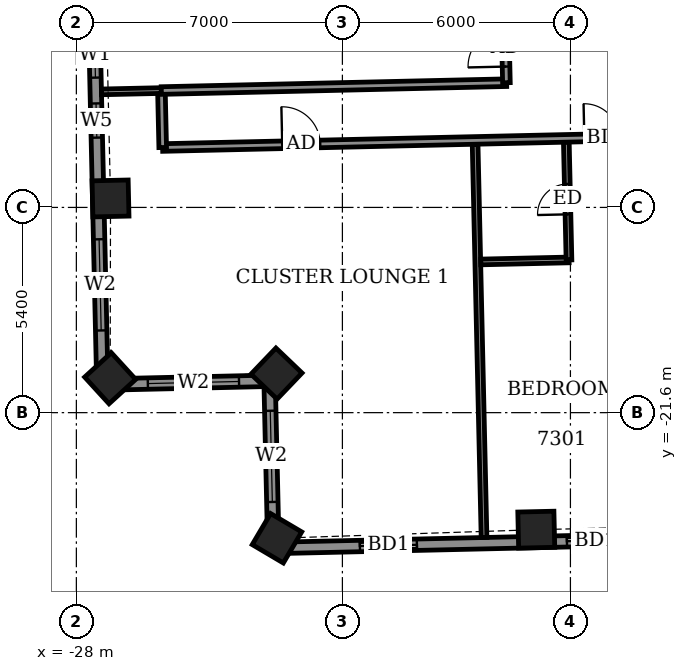
"""IFC4 building model, lengths in metres.
Left out: names, types, materials, properties, quantities, classifications, styles, units other than length and angle.
Written with IfcOpenShell. Run it as: python <this file> out.ifc"""

import sys

from ifc_helpers import new_model, si_unit, direction, frame, frame_2d, origin, origin_2d, place, context, subcontext, project, spatial, rectangle, extrude, element, fill, save


model = new_model("IFC4")
c1 = context("Model", 3, precision=1e-05, world=origin(), true_north=direction((0.0, 1.0)))
c2 = subcontext(c1, "Body", "Model", "MODEL_VIEW")
j1 = project(units=[si_unit("LENGTHUNIT", "METRE"), si_unit("PLANEANGLEUNIT", "RADIAN")], contexts=[c1])
p1 = place(None, origin())
s1 = spatial("IfcSite", under=j1, at=p1, CompositionType="ELEMENT")
p2 = place(p1, origin())
s2 = spatial("IfcBuilding", under=s1, at=p2, CompositionType="ELEMENT")
p3 = place(p2, frame((0.0, 0.0, 287.1)))
s3 = spatial("IfcBuildingStorey", under=s2, at=p3, CompositionType="ELEMENT", Elevation=287.1)
for number, where, z_axis, x_axis in (
    (1, (-27.101, -15.964, -0.55), (0.0, 0.0, 1.0), (0.023, -1.0, 0.0)),
    (2, (-27.11, -20.695, -0.55), (0.0, 0.0, 1.0), (0.675, -0.738, 0.0)),
    (3, (-22.734, -20.572, -0.55), (0.0, 0.0, 1.0), (0.723, -0.691, 0.0)),
    (4, (-22.721, -24.905, -0.55), (0.0, 0.0, 1.0), (0.861, -0.509, 0.0)),
    (5, (-15.899, -24.679, -0.55), (0.0, 0.0, 1.0), (1.0, 0.023, 0.0)),
):
    element("IfcColumn", number, at=place(p3, frame(where, z_axis=z_axis, x_axis=x_axis)), inside=s3, PredefinedType="COLUMN", context=c2, shape_type="SweptSolid", body=[
        extrude(rectangle(XDim=0.95, YDim=0.95, at=origin_2d()), origin(), (0.0, 0.0, 1.0), 3.6),
    ])
p4 = place(p3, frame((-27.665, -5.416, 0.0), z_axis=(0.0, 0.0, 1.0), x_axis=(0.022660024814, -0.999743228672, 0.0)))
e6 = element("IfcWall", 6, at=p4, inside=s3, PredefinedType="SOLIDWALL", context=c2, shape_type="SweptSolid", body=[
    extrude(rectangle(XDim=15.45, YDim=0.3, at=frame_2d((7.725, 0.0))), origin(), (0.0, 0.0, 1.0), 2.55),
])
p5 = place(p4, frame((1.35, 0.0, 0.0)))
e7 = element("IfcOpeningElement", 7, at=p5, cuts=e6, PredefinedType="OPENING", context=c2, shape_type="SweptSolid", body=[
    extrude(rectangle(XDim=1.5, YDim=2.4, at=frame_2d((0.75, 1.2))), frame((0.0, 0.16, 0.0), z_axis=(0.0, -1.0, 0.0), x_axis=(1.0, 0.0, 0.0)), (0.0, 0.0, 1.0), 0.32),
])
p6 = place(p4, frame((6.171, 0.0, 0.9)))
e8 = element("IfcOpeningElement", 8, at=p6, cuts=e6, PredefinedType="OPENING", context=c2, shape_type="SweptSolid", body=[
    extrude(rectangle(XDim=1.2, YDim=1.5, at=frame_2d((0.6, 0.75))), frame((0.0, 0.16, 0.0), z_axis=(0.0, -1.0, 0.0), x_axis=(1.0, 0.0, 0.0)), (0.0, 0.0, 1.0), 0.32),
])
p7 = place(p4, frame((8.05, 0.0, 0.9)))
e9 = element("IfcOpeningElement", 9, at=p7, cuts=e6, PredefinedType="OPENING", context=c2, shape_type="SweptSolid", body=[
    extrude(rectangle(XDim=0.9, YDim=1.5, at=frame_2d((0.45, 0.75))), frame((0.0, 0.16, 0.0), z_axis=(0.0, -1.0, 0.0), x_axis=(1.0, 0.0, 0.0)), (0.0, 0.0, 1.0), 0.32),
])
p8 = place(p4, frame((11.625, 0.0, 0.9)))
e10 = element("IfcOpeningElement", 10, at=p8, cuts=e6, PredefinedType="OPENING", context=c2, shape_type="SweptSolid", body=[
    extrude(rectangle(XDim=2.4, YDim=1.5, at=frame_2d((1.2, 0.75))), frame((0.0, 0.16, 0.0), z_axis=(0.0, -1.0, 0.0), x_axis=(1.0, 0.0, 0.0)), (0.0, 0.0, 1.0), 0.32),
])
p9 = place(p3, frame((-27.315, -20.862, 0.0), z_axis=(0.0, 0.0, 1.0), x_axis=(0.999741204967, 0.022749133868, 0.0)))
e11 = element("IfcWall", 11, at=p9, inside=s3, PredefinedType="SOLIDWALL", context=c2, shape_type="SweptSolid", body=[
    extrude(rectangle(XDim=4.4, YDim=0.3, at=frame_2d((2.2, 0.0))), origin(), (0.0, 0.0, 1.0), 2.55),
])
p10 = place(p9, frame((1.196, 0.0, 0.9)))
e12 = element("IfcOpeningElement", 12, at=p10, cuts=e11, PredefinedType="OPENING", context=c2, shape_type="SweptSolid", body=[
    extrude(rectangle(XDim=2.4, YDim=1.5, at=frame_2d((1.2, 0.75))), frame((0.0, 0.16, 0.0), z_axis=(0.0, -1.0, 0.0), x_axis=(1.0, 0.0, 0.0)), (0.0, 0.0, 1.0), 0.32),
])
p11 = place(p3, frame((-22.916, -20.762, 0.0), z_axis=(0.0, 0.0, 1.0), x_axis=(0.022749133868, -0.999741204967, 0.0)))
e13 = element("IfcWall", 13, at=p11, inside=s3, PredefinedType="SOLIDWALL", context=c2, shape_type="SweptSolid", body=[
    extrude(rectangle(XDim=4.4, YDim=0.3, at=frame_2d((2.2, 0.0))), origin(), (0.0, 0.0, 1.0), 2.55),
])
p12 = place(p11, frame((0.789, 0.0, 0.9)))
e14 = element("IfcOpeningElement", 14, at=p12, cuts=e13, PredefinedType="OPENING", context=c2, shape_type="SweptSolid", body=[
    extrude(rectangle(XDim=2.4, YDim=1.5, at=frame_2d((1.2, 0.75))), frame((0.0, 0.16, 0.0), z_axis=(0.0, -1.0, 0.0), x_axis=(1.0, 0.0, 0.0)), (0.0, 0.0, 1.0), 0.32),
])
p13 = place(p3, frame((-22.816, -25.161, 0.0), z_axis=(0.0, 0.0, 1.0), x_axis=(0.999742646411, 0.022685699159, 0.0)))
e15 = element("IfcWall", 15, at=p13, inside=s3, PredefinedType="SOLIDWALL", context=c2, shape_type="SweptSolid", body=[
    extrude(rectangle(XDim=49.236, YDim=0.3, at=frame_2d((24.618, 0.0))), origin(), (0.0, 0.0, 1.0), 2.5),
])
p14 = place(p13, frame((2.277, 0.0, 0.0)))
e16 = element("IfcOpeningElement", 16, at=p14, cuts=e15, PredefinedType="OPENING", context=c2, shape_type="SweptSolid", body=[
    extrude(rectangle(XDim=1.5, YDim=2.4, at=frame_2d((0.75, 1.2))), frame((0.0, 0.16, 0.0), z_axis=(0.0, -1.0, 0.0), x_axis=(1.0, 0.0, 0.0)), (0.0, 0.0, 1.0), 0.32),
])
p15 = place(p13, frame((7.726, 0.0, 0.0)))
e17 = element("IfcOpeningElement", 17, at=p15, cuts=e15, PredefinedType="OPENING", context=c2, shape_type="SweptSolid", body=[
    extrude(rectangle(XDim=1.5, YDim=2.4, at=frame_2d((0.75, 1.2))), frame((0.0, 0.16, 0.0), z_axis=(0.0, -1.0, 0.0), x_axis=(1.0, 0.0, 0.0)), (0.0, 0.0, 1.0), 0.32),
])
p16 = place(p13, frame((11.039, 0.0, 0.0)))
e18 = element("IfcOpeningElement", 18, at=p16, cuts=e15, PredefinedType="OPENING", context=c2, shape_type="SweptSolid", body=[
    extrude(rectangle(XDim=1.5, YDim=2.4, at=frame_2d((0.75, 1.2))), frame((0.0, 0.16, 0.0), z_axis=(0.0, -1.0, 0.0), x_axis=(1.0, 0.0, 0.0)), (0.0, 0.0, 1.0), 0.32),
])
p17 = place(p13, frame((15.589, 0.0, 0.0)))
e19 = element("IfcOpeningElement", 19, at=p17, cuts=e15, PredefinedType="OPENING", context=c2, shape_type="SweptSolid", body=[
    extrude(rectangle(XDim=1.5, YDim=2.4, at=frame_2d((0.75, 1.2))), frame((0.0, 0.16, 0.0), z_axis=(0.0, -1.0, 0.0), x_axis=(1.0, 0.0, 0.0)), (0.0, 0.0, 1.0), 0.32),
])
p18 = place(p13, frame((18.903, 0.0, 0.0)))
e20 = element("IfcOpeningElement", 20, at=p18, cuts=e15, PredefinedType="OPENING", context=c2, shape_type="SweptSolid", body=[
    extrude(rectangle(XDim=1.5, YDim=2.4, at=frame_2d((0.75, 1.2))), frame((0.0, 0.16, 0.0), z_axis=(0.0, -1.0, 0.0), x_axis=(1.0, 0.0, 0.0)), (0.0, 0.0, 1.0), 0.32),
])
p19 = place(p13, frame((24.3, 0.0, 0.0)))
e21 = element("IfcOpeningElement", 21, at=p19, cuts=e15, PredefinedType="OPENING", context=c2, shape_type="SweptSolid", body=[
    extrude(rectangle(XDim=1.5, YDim=2.4, at=frame_2d((0.75, 1.2))), frame((0.0, 0.16, 0.0), z_axis=(0.0, -1.0, 0.0), x_axis=(1.0, 0.0, 0.0)), (0.0, 0.0, 1.0), 0.32),
])
p20 = place(p13, frame((29.265, 0.0, 0.0)))
e22 = element("IfcOpeningElement", 22, at=p20, cuts=e15, PredefinedType="OPENING", context=c2, shape_type="SweptSolid", body=[
    extrude(rectangle(XDim=1.5, YDim=2.4, at=frame_2d((0.75, 1.2))), frame((0.0, 0.16, 0.0), z_axis=(0.0, -1.0, 0.0), x_axis=(1.0, 0.0, 0.0)), (0.0, 0.0, 1.0), 0.32),
])
p21 = place(p13, frame((32.579, 0.0, 0.0)))
e23 = element("IfcOpeningElement", 23, at=p21, cuts=e15, PredefinedType="OPENING", context=c2, shape_type="SweptSolid", body=[
    extrude(rectangle(XDim=1.5, YDim=2.4, at=frame_2d((0.75, 1.2))), frame((0.0, 0.16, 0.0), z_axis=(0.0, -1.0, 0.0), x_axis=(1.0, 0.0, 0.0)), (0.0, 0.0, 1.0), 0.32),
])
p22 = place(p13, frame((37.4, 0.0, 0.0)))
e24 = element("IfcOpeningElement", 24, at=p22, cuts=e15, PredefinedType="OPENING", context=c2, shape_type="SweptSolid", body=[
    extrude(rectangle(XDim=1.5, YDim=2.4, at=frame_2d((0.75, 1.2))), frame((0.0, 0.16, 0.0), z_axis=(0.0, -1.0, 0.0), x_axis=(1.0, 0.0, 0.0)), (0.0, 0.0, 1.0), 0.32),
])
p23 = place(p13, frame((42.967, 0.0, 0.0)))
e25 = element("IfcOpeningElement", 25, at=p23, cuts=e15, PredefinedType="OPENING", context=c2, shape_type="SweptSolid", body=[
    extrude(rectangle(XDim=1.2, YDim=2.4, at=frame_2d((0.6, 1.2))), frame((0.0, 0.16, 0.0), z_axis=(0.0, -1.0, 0.0), x_axis=(1.0, 0.0, 0.0)), (0.0, 0.0, 1.0), 0.32),
])
p24 = place(p13, frame((45.421, 0.0, 0.9)))
e26 = element("IfcOpeningElement", 26, at=p24, cuts=e15, PredefinedType="OPENING", context=c2, shape_type="SweptSolid", body=[
    extrude(rectangle(XDim=2.4, YDim=1.5, at=frame_2d((1.2, 0.75))), frame((0.0, 0.16, 0.0), z_axis=(0.0, -1.0, 0.0), x_axis=(1.0, 0.0, 0.0)), (0.0, 0.0, 1.0), 0.32),
])
p25 = place(p3, frame((-17.273, -24.885, 0.0), z_axis=(0.0, 0.0, 1.0), x_axis=(-0.022716582742, 0.999741945138, 0.0)))
e27 = element("IfcWall", 27, at=p25, inside=s3, PredefinedType="PARTITIONING", context=c2, shape_type="SweptSolid", body=[
    extrude(rectangle(XDim=10.35, YDim=0.15, at=frame_2d((5.175, 0.0))), origin(), (0.0, 0.0, 1.0), 2.55),
])
p26 = place(p3, frame((-17.36, -17.635, 0.0), z_axis=(0.0, 0.0, 1.0), x_axis=(0.99974031529, 0.022788198363, 0.0)))
e28 = element("IfcWall", 28, at=p26, inside=s3, PredefinedType="PARTITIONING", context=c2, shape_type="SweptSolid", body=[
    extrude(rectangle(XDim=2.325, YDim=0.15, at=frame_2d((1.162, 0.0))), origin(), (0.0, 0.0, 1.0), 3.05),
])
p27 = place(p3, frame((-15.038, -17.582, 0.0), z_axis=(0.0, 0.0, 1.0), x_axis=(-0.022524613091, 0.999746288718, 0.0)))
e29 = element("IfcWall", 29, at=p27, inside=s3, PredefinedType="PARTITIONING", context=c2, shape_type="SweptSolid", body=[
    extrude(rectangle(XDim=3.1, YDim=0.15, at=frame_2d((1.55, 0.0))), origin(), (0.0, 0.0, 1.0), 3.05),
])
p28 = place(p27, frame((1.2, 0.0, 0.0)))
e30 = element("IfcOpeningElement", 30, at=p28, cuts=e29, PredefinedType="OPENING", context=c2, shape_type="SweptSolid", body=[
    extrude(rectangle(XDim=0.8, YDim=2.1, at=frame_2d((0.4, 1.05))), frame((0.0, 0.085, 0.0), z_axis=(0.0, -1.0, 0.0), x_axis=(1.0, 0.0, 0.0)), (0.0, 0.0, 1.0), 0.17),
])
p29 = place(p3, frame((-25.731, -14.624, 0.0), z_axis=(0.0, 0.0, 1.0), x_axis=(0.999742799525, 0.022678950563, 0.0)))
e31 = element("IfcWall", 31, at=p29, inside=s3, PredefinedType="PARTITIONING", context=c2, shape_type="SweptSolid", body=[
    extrude(rectangle(XDim=55.386, YDim=0.2, at=frame_2d((27.693, 0.0))), origin(), (0.0, 0.0, 1.0), 3.05),
])
p30 = place(p29, frame((3.149, 0.0, 0.0)))
e32 = element("IfcOpeningElement", 32, at=p30, cuts=e31, PredefinedType="OPENING", context=c2, shape_type="SweptSolid", body=[
    extrude(rectangle(XDim=1.0, YDim=2.1, at=frame_2d((0.5, 1.05))), frame((0.0, 0.11, 0.0), z_axis=(0.0, -1.0, 0.0), x_axis=(1.0, 0.0, 0.0)), (0.0, 0.0, 1.0), 0.22),
])
p31 = place(p29, frame((11.1, 0.0, 0.0)))
e33 = element("IfcOpeningElement", 33, at=p31, cuts=e31, PredefinedType="OPENING", context=c2, shape_type="SweptSolid", body=[
    extrude(rectangle(XDim=0.9, YDim=2.1, at=frame_2d((0.45, 1.05))), frame((0.0, 0.11, 0.0), z_axis=(0.0, -1.0, 0.0), x_axis=(1.0, 0.0, 0.0)), (0.0, 0.0, 1.0), 0.22),
])
p32 = place(p29, frame((12.95, 0.0, 0.0)))
e34 = element("IfcOpeningElement", 34, at=p32, cuts=e31, PredefinedType="OPENING", context=c2, shape_type="SweptSolid", body=[
    extrude(rectangle(XDim=0.9, YDim=2.1, at=frame_2d((0.45, 1.05))), frame((0.0, 0.11, 0.0), z_axis=(0.0, -1.0, 0.0), x_axis=(1.0, 0.0, 0.0)), (0.0, 0.0, 1.0), 0.22),
])
p33 = place(p29, frame((19.675, 0.0, 0.0)))
e35 = element("IfcOpeningElement", 35, at=p33, cuts=e31, PredefinedType="OPENING", context=c2, shape_type="SweptSolid", body=[
    extrude(rectangle(XDim=0.9, YDim=2.1, at=frame_2d((0.45, 1.05))), frame((0.0, 0.11, 0.0), z_axis=(0.0, -1.0, 0.0), x_axis=(1.0, 0.0, 0.0)), (0.0, 0.0, 1.0), 0.22),
])
p34 = place(p29, frame((21.7, 0.0, 0.0)))
e36 = element("IfcOpeningElement", 36, at=p34, cuts=e31, PredefinedType="OPENING", context=c2, shape_type="SweptSolid", body=[
    extrude(rectangle(XDim=0.9, YDim=2.1, at=frame_2d((0.45, 1.05))), frame((0.0, 0.11, 0.0), z_axis=(0.0, -1.0, 0.0), x_axis=(1.0, 0.0, 0.0)), (0.0, 0.0, 1.0), 0.22),
])
p35 = place(p29, frame((28.475, 0.0, 0.0)))
e37 = element("IfcOpeningElement", 37, at=p35, cuts=e31, PredefinedType="OPENING", context=c2, shape_type="SweptSolid", body=[
    extrude(rectangle(XDim=0.9, YDim=2.1, at=frame_2d((0.45, 1.05))), frame((0.0, 0.11, 0.0), z_axis=(0.0, -1.0, 0.0), x_axis=(1.0, 0.0, 0.0)), (0.0, 0.0, 1.0), 0.22),
])
p36 = place(p29, frame((30.45, 0.0, 0.0)))
e38 = element("IfcOpeningElement", 38, at=p36, cuts=e31, PredefinedType="OPENING", context=c2, shape_type="SweptSolid", body=[
    extrude(rectangle(XDim=0.9, YDim=2.1, at=frame_2d((0.45, 1.05))), frame((0.0, 0.11, 0.0), z_axis=(0.0, -1.0, 0.0), x_axis=(1.0, 0.0, 0.0)), (0.0, 0.0, 1.0), 0.22),
])
p37 = place(p29, frame((37.25, 0.0, 0.0)))
e39 = element("IfcOpeningElement", 39, at=p37, cuts=e31, PredefinedType="OPENING", context=c2, shape_type="SweptSolid", body=[
    extrude(rectangle(XDim=0.9, YDim=2.1, at=frame_2d((0.45, 1.05))), frame((0.0, 0.11, 0.0), z_axis=(0.0, -1.0, 0.0), x_axis=(1.0, 0.0, 0.0)), (0.0, 0.0, 1.0), 0.22),
])
p38 = place(p29, frame((39.175, 0.0, 0.0)))
e40 = element("IfcOpeningElement", 40, at=p38, cuts=e31, PredefinedType="OPENING", context=c2, shape_type="SweptSolid", body=[
    extrude(rectangle(XDim=0.9, YDim=2.1, at=frame_2d((0.45, 1.05))), frame((0.0, 0.11, 0.0), z_axis=(0.0, -1.0, 0.0), x_axis=(1.0, 0.0, 0.0)), (0.0, 0.0, 1.0), 0.22),
])
p39 = place(p29, frame((45.875, 0.0, 0.0)))
e41 = element("IfcOpeningElement", 41, at=p39, cuts=e31, PredefinedType="OPENING", context=c2, shape_type="SweptSolid", body=[
    extrude(rectangle(XDim=0.9, YDim=2.1, at=frame_2d((0.45, 1.05))), frame((0.0, 0.11, 0.0), z_axis=(0.0, -1.0, 0.0), x_axis=(1.0, 0.0, 0.0)), (0.0, 0.0, 1.0), 0.22),
])
p40 = place(p29, frame((51.127, 0.0, 0.0)))
e42 = element("IfcOpeningElement", 42, at=p40, cuts=e31, PredefinedType="OPENING", context=c2, shape_type="SweptSolid", body=[
    extrude(rectangle(XDim=1.0, YDim=2.1, at=frame_2d((0.5, 1.05))), frame((0.0, 0.11, 0.0), z_axis=(0.0, -1.0, 0.0), x_axis=(1.0, 0.0, 0.0)), (0.0, 0.0, 1.0), 0.22),
])
p41 = place(p3, frame((-25.728, -14.624, 0.0), z_axis=(0.0, 0.0, 1.0), x_axis=(-0.022632637625, 0.99974384905, 0.0)))
e43 = element("IfcWall", 43, at=p41, inside=s3, PredefinedType="PARTITIONING", context=c2, shape_type="SweptSolid", body=[
    extrude(rectangle(XDim=1.5, YDim=0.2, at=frame_2d((0.75, 0.0))), origin(), (0.0, 0.0, 1.0), 3.05),
])
p42 = place(p3, frame((-27.339, -13.16, 0.0), z_axis=(0.0, 0.0, 1.0), x_axis=(0.999754171712, 0.022171967518, 0.0)))
e44 = element("IfcWall", 44, at=p42, inside=s3, PredefinedType="PARTITIONING", context=c2, shape_type="SweptSolid", body=[
    extrude(rectangle(XDim=1.575, YDim=0.15, at=frame_2d((0.787, 0.0))), origin(), (0.0, 0.0, 1.0), 2.55),
])
p43 = place(p3, frame((-25.765, -13.125, 0.0), z_axis=(0.0, 0.0, 1.0), x_axis=(0.999740502457, 0.022779985654, 0.0)))
e45 = element("IfcWall", 45, at=p43, inside=s3, PredefinedType="PARTITIONING", context=c2, shape_type="SweptSolid", body=[
    extrude(rectangle(XDim=9.088, YDim=0.2, at=frame_2d((4.544, 0.0))), origin(), (0.0, 0.0, 1.0), 3.05),
])
p44 = place(p3, frame((-16.684, -12.919, 0.0), z_axis=(0.0, 0.0, 1.0), x_axis=(-0.022712214871, 0.999742044377, 0.0)))
e46 = element("IfcWall", 46, at=p44, inside=s3, PredefinedType="PARTITIONING", context=c2, shape_type="SweptSolid", body=[
    extrude(rectangle(XDim=26.551, YDim=0.2, at=frame_2d((13.275, 0.0))), origin(), (0.0, 0.0, 1.0), 3.05),
])
p45 = place(p44, frame((24.688, 0.0, 0.0)))
e47 = element("IfcOpeningElement", 47, at=p45, cuts=e46, PredefinedType="OPENING", context=c2, shape_type="SweptSolid", body=[
    extrude(rectangle(XDim=1.0, YDim=2.1, at=frame_2d((0.5, 1.05))), frame((0.0, 0.11, 0.0), z_axis=(0.0, -1.0, 0.0), x_axis=(1.0, 0.0, 0.0)), (0.0, 0.0, 1.0), 0.22),
])
p46 = place(p44, frame((21.975, 0.0, 0.0)))
e48 = element("IfcOpeningElement", 48, at=p46, cuts=e46, PredefinedType="OPENING", context=c2, shape_type="SweptSolid", body=[
    extrude(rectangle(XDim=0.9, YDim=2.1, at=frame_2d((0.45, 1.05))), frame((0.0, 0.11, 0.0), z_axis=(0.0, -1.0, 0.0), x_axis=(1.0, 0.0, 0.0)), (0.0, 0.0, 1.0), 0.22),
])
p47 = place(p44, frame((16.875, 0.0, 0.0)))
e49 = element("IfcOpeningElement", 49, at=p47, cuts=e46, PredefinedType="OPENING", context=c2, shape_type="SweptSolid", body=[
    extrude(rectangle(XDim=1.0, YDim=2.1, at=frame_2d((0.5, 1.05))), frame((0.0, 0.11, 0.0), z_axis=(0.0, -1.0, 0.0), x_axis=(1.0, 0.0, 0.0)), (0.0, 0.0, 1.0), 0.22),
])
p48 = place(p44, frame((19.375, 0.0, 0.0)))
e50 = element("IfcOpeningElement", 50, at=p48, cuts=e46, PredefinedType="OPENING", context=c2, shape_type="SweptSolid", body=[
    extrude(rectangle(XDim=0.9, YDim=2.1, at=frame_2d((0.45, 1.05))), frame((0.0, 0.11, 0.0), z_axis=(0.0, -1.0, 0.0), x_axis=(1.0, 0.0, 0.0)), (0.0, 0.0, 1.0), 0.22),
])
p49 = place(p44, frame((14.05, 0.0, 0.0)))
e51 = element("IfcOpeningElement", 51, at=p49, cuts=e46, PredefinedType="OPENING", context=c2, shape_type="SweptSolid", body=[
    extrude(rectangle(XDim=1.0, YDim=2.1, at=frame_2d((0.5, 1.05))), frame((0.0, 0.11, 0.0), z_axis=(0.0, -1.0, 0.0), x_axis=(1.0, 0.0, 0.0)), (0.0, 0.0, 1.0), 0.22),
])
p50 = place(p44, frame((11.225, 0.0, 0.0)))
e52 = element("IfcOpeningElement", 52, at=p50, cuts=e46, PredefinedType="OPENING", context=c2, shape_type="SweptSolid", body=[
    extrude(rectangle(XDim=0.9, YDim=2.1, at=frame_2d((0.45, 1.05))), frame((0.0, 0.11, 0.0), z_axis=(0.0, -1.0, 0.0), x_axis=(1.0, 0.0, 0.0)), (0.0, 0.0, 1.0), 0.22),
])
p51 = place(p44, frame((8.37, 0.0, 0.0)))
e53 = element("IfcOpeningElement", 53, at=p51, cuts=e46, PredefinedType="OPENING", context=c2, shape_type="SweptSolid", body=[
    extrude(rectangle(XDim=1.0, YDim=2.1, at=frame_2d((0.5, 1.05))), frame((0.0, 0.11, 0.0), z_axis=(0.0, -1.0, 0.0), x_axis=(1.0, 0.0, 0.0)), (0.0, 0.0, 1.0), 0.22),
])
p52 = place(p44, frame((5.263, 0.0, 0.0)))
e54 = element("IfcOpeningElement", 54, at=p52, cuts=e46, PredefinedType="OPENING", context=c2, shape_type="SweptSolid", body=[
    extrude(rectangle(XDim=1.0, YDim=2.1, at=frame_2d((0.5, 1.05))), frame((0.0, 0.11, 0.0), z_axis=(0.0, -1.0, 0.0), x_axis=(1.0, 0.0, 0.0)), (0.0, 0.0, 1.0), 0.22),
])
p53 = place(p44, frame((0.425, 0.0, 0.0)))
e55 = element("IfcOpeningElement", 55, at=p53, cuts=e46, PredefinedType="OPENING", context=c2, shape_type="SweptSolid", body=[
    extrude(rectangle(XDim=1.0, YDim=2.1, at=frame_2d((0.5, 1.05))), frame((0.0, 0.11, 0.0), z_axis=(0.0, -1.0, 0.0), x_axis=(1.0, 0.0, 0.0)), (0.0, 0.0, 1.0), 0.22),
])
p54 = place(p44, frame((2.6, 0.0, 0.0)))
e56 = element("IfcOpeningElement", 56, at=p54, cuts=e46, PredefinedType="OPENING", context=c2, shape_type="SweptSolid", body=[
    extrude(rectangle(XDim=0.9, YDim=2.1, at=frame_2d((0.45, 1.05))), frame((0.0, 0.11, 0.0), z_axis=(0.0, -1.0, 0.0), x_axis=(1.0, 0.0, 0.0)), (0.0, 0.0, 1.0), 0.22),
])
p55 = place(p6, origin())
e57 = element("IfcWindow", 57, at=p55, inside=s3, PartitioningType="SINGLE_PANEL", PredefinedType="WINDOW", context=c2, shape_type="SweptSolid", body=[
    extrude(rectangle(XDim=1.2, YDim=1.5, at=frame_2d((0.6, 0.75))), frame((0.0, 0.03, 0.0), z_axis=(0.0, -1.0, 0.0), x_axis=(1.0, 0.0, 0.0)), (0.0, 0.0, 1.0), 0.06),
])
fill(e8, e57)
p56 = place(p7, origin())
e58 = element("IfcWindow", 58, at=p56, inside=s3, PartitioningType="SINGLE_PANEL", PredefinedType="WINDOW", context=c2, shape_type="SweptSolid", body=[
    extrude(rectangle(XDim=0.9, YDim=1.5, at=frame_2d((0.45, 0.75))), frame((0.0, 0.03, 0.0), z_axis=(0.0, -1.0, 0.0), x_axis=(1.0, 0.0, 0.0)), (0.0, 0.0, 1.0), 0.06),
])
fill(e9, e58)
p57 = place(p8, origin())
e59 = element("IfcWindow", 59, at=p57, inside=s3, PartitioningType="DOUBLE_PANEL_VERTICAL", PredefinedType="WINDOW", context=c2, shape_type="SweptSolid", body=[
    extrude(rectangle(XDim=2.4, YDim=1.5, at=frame_2d((1.2, 0.75))), frame((0.0, 0.03, 0.0), z_axis=(0.0, -1.0, 0.0), x_axis=(1.0, 0.0, 0.0)), (0.0, 0.0, 1.0), 0.06),
])
fill(e10, e59)
p58 = place(p10, origin())
e60 = element("IfcWindow", 60, at=p58, inside=s3, PartitioningType="DOUBLE_PANEL_VERTICAL", PredefinedType="WINDOW", context=c2, shape_type="SweptSolid", body=[
    extrude(rectangle(XDim=2.4, YDim=1.5, at=frame_2d((1.2, 0.75))), frame((0.0, 0.03, 0.0), z_axis=(0.0, -1.0, 0.0), x_axis=(1.0, 0.0, 0.0)), (0.0, 0.0, 1.0), 0.06),
])
fill(e12, e60)
p59 = place(p12, origin())
e61 = element("IfcWindow", 61, at=p59, inside=s3, PartitioningType="DOUBLE_PANEL_VERTICAL", PredefinedType="WINDOW", context=c2, shape_type="SweptSolid", body=[
    extrude(rectangle(XDim=2.4, YDim=1.5, at=frame_2d((1.2, 0.75))), frame((0.0, 0.03, 0.0), z_axis=(0.0, -1.0, 0.0), x_axis=(1.0, 0.0, 0.0)), (0.0, 0.0, 1.0), 0.06),
])
fill(e14, e61)
p60 = place(p14, origin())
e62 = element("IfcDoor", 62, at=p60, inside=s3, OperationType="SLIDING_TO_LEFT", PredefinedType="DOOR", context=c2, shape_type="SweptSolid", body=[
    extrude(rectangle(XDim=1.5, YDim=2.4, at=frame_2d((0.75, 1.2))), frame((0.0, 0.025, 0.0), z_axis=(0.0, -1.0, 0.0), x_axis=(1.0, 0.0, 0.0)), (0.0, 0.0, 1.0), 0.05),
])
fill(e16, e62)
p61 = place(p15, origin())
e63 = element("IfcDoor", 63, at=p61, inside=s3, OperationType="SLIDING_TO_LEFT", PredefinedType="DOOR", context=c2, shape_type="SweptSolid", body=[
    extrude(rectangle(XDim=1.5, YDim=2.4, at=frame_2d((0.75, 1.2))), frame((0.0, 0.025, 0.0), z_axis=(0.0, -1.0, 0.0), x_axis=(1.0, 0.0, 0.0)), (0.0, 0.0, 1.0), 0.05),
])
fill(e17, e63)
p62 = place(p30, origin())
e64 = element("IfcDoor", 64, at=p62, inside=s3, OperationType="SINGLE_SWING_LEFT", PredefinedType="DOOR", context=c2, shape_type="SweptSolid", body=[
    extrude(rectangle(XDim=1.0, YDim=2.1, at=frame_2d((0.5, 1.05))), frame((0.0, 0.025, 0.0), z_axis=(0.0, -1.0, 0.0), x_axis=(1.0, 0.0, 0.0)), (0.0, 0.0, 1.0), 0.05),
])
fill(e32, e64)
p63 = place(p31, origin())
e65 = element("IfcDoor", 65, at=p63, inside=s3, OperationType="SINGLE_SWING_LEFT", PredefinedType="DOOR", context=c2, shape_type="SweptSolid", body=[
    extrude(rectangle(XDim=0.9, YDim=2.1, at=frame_2d((0.45, 1.05))), frame((0.0, 0.025, 0.0), z_axis=(0.0, -1.0, 0.0), x_axis=(1.0, 0.0, 0.0)), (0.0, 0.0, 1.0), 0.05),
])
fill(e33, e65)
p64 = place(p28, origin())
e66 = element("IfcDoor", 66, at=p64, inside=s3, OperationType="SINGLE_SWING_LEFT", PredefinedType="DOOR", context=c2, shape_type="SweptSolid", body=[
    extrude(rectangle(XDim=0.8, YDim=2.1, at=frame_2d((0.4, 1.05))), frame((0.0, 0.025, 0.0), z_axis=(0.0, -1.0, 0.0), x_axis=(1.0, 0.0, 0.0)), (0.0, 0.0, 1.0), 0.05),
])
fill(e30, e66)
p65 = place(p53, origin())
e67 = element("IfcDoor", 67, at=p65, inside=s3, OperationType="SINGLE_SWING_RIGHT", PredefinedType="DOOR", context=c2, shape_type="SweptSolid", body=[
    extrude(rectangle(XDim=1.0, YDim=2.1, at=frame_2d((0.5, 1.05))), frame((0.0, 0.025, 0.0), z_axis=(0.0, -1.0, 0.0), x_axis=(1.0, 0.0, 0.0)), (0.0, 0.0, 1.0), 0.05),
])
fill(e55, e67)
save(model, sys.argv[1])
